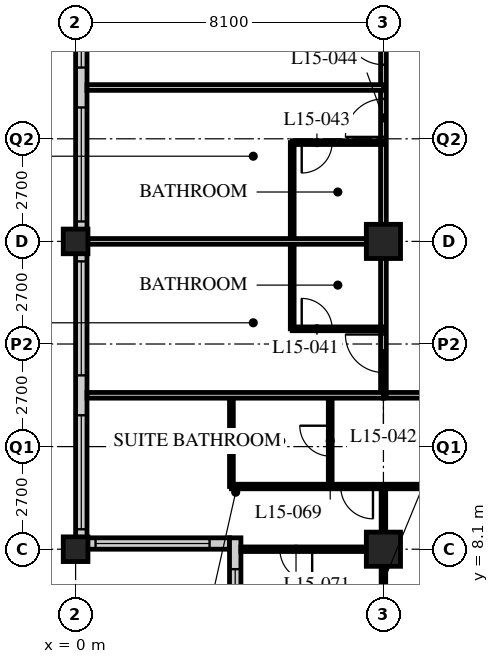
"""IFC4 building model, lengths in metres.
Left out: names, types, materials, properties, quantities, classifications, styles, units other than length and angle.
Written with IfcOpenShell. Run it as: python <this file> out.ifc"""

import sys

from ifc_helpers import new_model, si_unit, direction, frame, frame_2d, origin, origin_2d, place, context, subcontext, project, spatial, rectangle, hollow_rectangle, extrude, element, fill, save


model = new_model("IFC4")
c1 = context("Model", 3, precision=1e-05, world=origin(), true_north=direction((0.0, 1.0)))
c2 = subcontext(c1, "Body", "Model", "MODEL_VIEW")
j1 = project(units=[si_unit("LENGTHUNIT", "METRE"), si_unit("PLANEANGLEUNIT", "RADIAN")], contexts=[c1])
p1 = place(None, origin())
s1 = spatial("IfcSite", under=j1, at=p1, CompositionType="ELEMENT")
p2 = place(p1, origin())
s2 = spatial("IfcBuilding", under=s1, at=p2, CompositionType="ELEMENT")
p3 = place(p2, frame((0.0, 0.0, 63.6)))
s3 = spatial("IfcBuildingStorey", under=s2, at=p3, CompositionType="ELEMENT", Elevation=63.6)
for number, where, z_axis, x_axis in (
    (1, (0.0, 8.1, 0.0), (0.0, 0.0, 1.0), (1.0, 0.0, 0.0)),
    (2, (0.0, 16.2, 0.0), (0.0, 0.0, 1.0), (1.0, 0.0, 0.0)),
):
    element("IfcColumn", number, at=place(p3, frame(where, z_axis=z_axis, x_axis=x_axis)), inside=s3, PredefinedType="COLUMN", context=c2, shape_type="SweptSolid", body=[
        extrude(hollow_rectangle(XDim=0.65, YDim=0.65, WallThickness=0.05, at=origin_2d()), origin(), (0.0, 0.0, 1.0), 3.4),
    ])
for number, where, z_axis, x_axis in (
    (3, (8.1, 8.1, 0.0), (0.0, 0.0, 1.0), (1.0, 0.0, 0.0)),
    (4, (8.1, 16.2, 0.0), (0.0, 0.0, 1.0), (1.0, 0.0, 0.0)),
):
    element("IfcColumn", number, at=place(p3, frame(where, z_axis=z_axis, x_axis=x_axis)), inside=s3, PredefinedType="COLUMN", context=c2, shape_type="SweptSolid", body=[
        extrude(hollow_rectangle(XDim=0.9, YDim=0.9, WallThickness=0.09, at=origin_2d()), origin(), (0.0, 0.0, 1.0), 3.4),
    ])
p4 = place(p3, frame((0.15, 40.2, 0.0), z_axis=(0.0, 0.0, 1.0), x_axis=(0.0, -1.0, 0.0)))
e5 = element("IfcWall", 5, at=p4, inside=s3, PredefinedType="SOLIDWALL", context=c2, shape_type="SweptSolid", body=[
    extrude(rectangle(XDim=32.1, YDim=0.3, at=frame_2d((16.05, 0.0))), origin(), (0.0, 0.0, 1.0), 3.19),
])
p5 = place(p4, frame((0.225, 0.0, 0.9)))
e6 = element("IfcOpeningElement", 6, at=p5, cuts=e5, PredefinedType="OPENING", context=c2, shape_type="SweptSolid", body=[
    extrude(rectangle(XDim=3.0, YDim=2.0, at=frame_2d((1.5, 1.0))), frame((0.0, 0.16, 0.0), z_axis=(0.0, -1.0, 0.0), x_axis=(1.0, 0.0, 0.0)), (0.0, 0.0, 1.0), 0.32),
])
p6 = place(p4, frame((4.275, 0.0, 0.9)))
e7 = element("IfcOpeningElement", 7, at=p6, cuts=e5, PredefinedType="OPENING", context=c2, shape_type="SweptSolid", body=[
    extrude(rectangle(XDim=3.0, YDim=2.0, at=frame_2d((1.5, 1.0))), frame((0.0, 0.16, 0.0), z_axis=(0.0, -1.0, 0.0), x_axis=(1.0, 0.0, 0.0)), (0.0, 0.0, 1.0), 0.32),
])
p7 = place(p4, frame((8.325, 0.0, 0.9)))
e8 = element("IfcOpeningElement", 8, at=p7, cuts=e5, PredefinedType="OPENING", context=c2, shape_type="SweptSolid", body=[
    extrude(rectangle(XDim=3.0, YDim=2.0, at=frame_2d((1.5, 1.0))), frame((0.0, 0.16, 0.0), z_axis=(0.0, -1.0, 0.0), x_axis=(1.0, 0.0, 0.0)), (0.0, 0.0, 1.0), 0.32),
])
p8 = place(p4, frame((12.375, 0.0, 0.9)))
e9 = element("IfcOpeningElement", 9, at=p8, cuts=e5, PredefinedType="OPENING", context=c2, shape_type="SweptSolid", body=[
    extrude(rectangle(XDim=3.0, YDim=2.0, at=frame_2d((1.5, 1.0))), frame((0.0, 0.16, 0.0), z_axis=(0.0, -1.0, 0.0), x_axis=(1.0, 0.0, 0.0)), (0.0, 0.0, 1.0), 0.32),
])
p9 = place(p4, frame((16.425, 0.0, 0.9)))
e10 = element("IfcOpeningElement", 10, at=p9, cuts=e5, PredefinedType="OPENING", context=c2, shape_type="SweptSolid", body=[
    extrude(rectangle(XDim=3.0, YDim=2.0, at=frame_2d((1.5, 1.0))), frame((0.0, 0.16, 0.0), z_axis=(0.0, -1.0, 0.0), x_axis=(1.0, 0.0, 0.0)), (0.0, 0.0, 1.0), 0.32),
])
p10 = place(p4, frame((20.475, 0.0, 0.9)))
e11 = element("IfcOpeningElement", 11, at=p10, cuts=e5, PredefinedType="OPENING", context=c2, shape_type="SweptSolid", body=[
    extrude(rectangle(XDim=3.0, YDim=2.0, at=frame_2d((1.5, 1.0))), frame((0.0, 0.16, 0.0), z_axis=(0.0, -1.0, 0.0), x_axis=(1.0, 0.0, 0.0)), (0.0, 0.0, 1.0), 0.32),
])
p11 = place(p4, frame((24.525, 0.0, 0.9)))
e12 = element("IfcOpeningElement", 12, at=p11, cuts=e5, PredefinedType="OPENING", context=c2, shape_type="SweptSolid", body=[
    extrude(rectangle(XDim=3.0, YDim=2.0, at=frame_2d((1.5, 1.0))), frame((0.0, 0.16, 0.0), z_axis=(0.0, -1.0, 0.0), x_axis=(1.0, 0.0, 0.0)), (0.0, 0.0, 1.0), 0.32),
])
p12 = place(p4, frame((28.575, 0.0, 0.9)))
e13 = element("IfcOpeningElement", 13, at=p12, cuts=e5, PredefinedType="OPENING", context=c2, shape_type="SweptSolid", body=[
    extrude(rectangle(XDim=3.0, YDim=2.0, at=frame_2d((1.5, 1.0))), frame((0.0, 0.16, 0.0), z_axis=(0.0, -1.0, 0.0), x_axis=(1.0, 0.0, 0.0)), (0.0, 0.0, 1.0), 0.32),
])
p13 = place(p3, frame((0.3, 8.25, 0.0), z_axis=(0.0, 0.0, 1.0), x_axis=(1.0, 0.0, 0.0)))
e14 = element("IfcWall", 14, at=p13, inside=s3, PredefinedType="SOLIDWALL", context=c2, shape_type="SweptSolid", body=[
    extrude(rectangle(XDim=3.75, YDim=0.3, at=frame_2d((1.875, 0.0))), origin(), (0.0, 0.0, 1.0), 3.19),
])
p14 = place(p13, frame((0.225, 0.0, 0.9)))
e15 = element("IfcOpeningElement", 15, at=p14, cuts=e14, PredefinedType="OPENING", context=c2, shape_type="SweptSolid", body=[
    extrude(rectangle(XDim=3.0, YDim=1.5, at=frame_2d((1.5, 0.75))), frame((0.0, 0.16, 0.0), z_axis=(0.0, -1.0, 0.0), x_axis=(1.0, 0.0, 0.0)), (0.0, 0.0, 1.0), 0.32),
])
p15 = place(p3, frame((4.2, 8.4, 0.0), z_axis=(0.0, 0.0, 1.0), x_axis=(0.0, -1.0, 0.0)))
e16 = element("IfcWall", 16, at=p15, inside=s3, PredefinedType="SOLIDWALL", context=c2, shape_type="SweptSolid", body=[
    extrude(rectangle(XDim=4.35, YDim=0.3, at=frame_2d((2.175, 0.0))), origin(), (0.0, 0.0, 1.0), 3.19),
])
p16 = place(p15, frame((0.825, 0.0, 0.9)))
e17 = element("IfcOpeningElement", 17, at=p16, cuts=e16, PredefinedType="OPENING", context=c2, shape_type="SweptSolid", body=[
    extrude(rectangle(XDim=3.0, YDim=1.5, at=frame_2d((1.5, 0.75))), frame((0.0, 0.16, 0.0), z_axis=(0.0, -1.0, 0.0), x_axis=(1.0, 0.0, 0.0)), (0.0, 0.0, 1.0), 0.32),
])
p17 = place(p3, frame((8.1, 12.15, 0.0), z_axis=(0.0, 0.0, 1.0), x_axis=(1.0, 0.0, 0.0)))
e18 = element("IfcWall", 18, at=p17, inside=s3, PredefinedType="PARTITIONING", context=c2, shape_type="SweptSolid", body=[
    extrude(rectangle(XDim=36.45, YDim=0.15, at=frame_2d((18.225, 0.0))), origin(), (0.0, 0.0, 1.0), 3.19),
])
p18 = place(p17, frame((4.35, 0.0, 0.0)))
e19 = element("IfcOpeningElement", 19, at=p18, cuts=e18, PredefinedType="OPENING", context=c2, shape_type="SweptSolid", body=[
    extrude(rectangle(XDim=1.0, YDim=2.1, at=frame_2d((0.5, 1.05))), frame((0.0, 0.085, 0.0), z_axis=(0.0, -1.0, 0.0), x_axis=(1.0, 0.0, 0.0)), (0.0, 0.0, 1.0), 0.17),
])
p19 = place(p17, frame((10.55, 0.0, 0.0)))
e20 = element("IfcOpeningElement", 20, at=p19, cuts=e18, PredefinedType="OPENING", context=c2, shape_type="SweptSolid", body=[
    extrude(rectangle(XDim=1.0, YDim=2.1, at=frame_2d((0.5, 1.05))), frame((0.0, 0.085, 0.0), z_axis=(0.0, -1.0, 0.0), x_axis=(1.0, 0.0, 0.0)), (0.0, 0.0, 1.0), 0.17),
])
p20 = place(p17, frame((14.6, 0.0, 0.0)))
e21 = element("IfcOpeningElement", 21, at=p20, cuts=e18, PredefinedType="OPENING", context=c2, shape_type="SweptSolid", body=[
    extrude(rectangle(XDim=1.0, YDim=2.1, at=frame_2d((0.5, 1.05))), frame((0.0, 0.085, 0.0), z_axis=(0.0, -1.0, 0.0), x_axis=(1.0, 0.0, 0.0)), (0.0, 0.0, 1.0), 0.17),
])
p21 = place(p17, frame((18.65, 0.0, 0.0)))
e22 = element("IfcOpeningElement", 22, at=p21, cuts=e18, PredefinedType="OPENING", context=c2, shape_type="SweptSolid", body=[
    extrude(rectangle(XDim=1.0, YDim=2.1, at=frame_2d((0.5, 1.05))), frame((0.0, 0.085, 0.0), z_axis=(0.0, -1.0, 0.0), x_axis=(1.0, 0.0, 0.0)), (0.0, 0.0, 1.0), 0.17),
])
p22 = place(p17, frame((22.7, 0.0, 0.0)))
e23 = element("IfcOpeningElement", 23, at=p22, cuts=e18, PredefinedType="OPENING", context=c2, shape_type="SweptSolid", body=[
    extrude(rectangle(XDim=1.0, YDim=2.1, at=frame_2d((0.5, 1.05))), frame((0.0, 0.085, 0.0), z_axis=(0.0, -1.0, 0.0), x_axis=(1.0, 0.0, 0.0)), (0.0, 0.0, 1.0), 0.17),
])
p23 = place(p17, frame((24.6, 0.0, 0.0)))
e24 = element("IfcOpeningElement", 24, at=p23, cuts=e18, PredefinedType="OPENING", context=c2, shape_type="SweptSolid", body=[
    extrude(rectangle(XDim=1.0, YDim=2.1, at=frame_2d((0.5, 1.05))), frame((0.0, 0.085, 0.0), z_axis=(0.0, -1.0, 0.0), x_axis=(1.0, 0.0, 0.0)), (0.0, 0.0, 1.0), 0.17),
])
p24 = place(p17, frame((30.8, 0.0, 0.0)))
e25 = element("IfcOpeningElement", 25, at=p24, cuts=e18, PredefinedType="OPENING", context=c2, shape_type="SweptSolid", body=[
    extrude(rectangle(XDim=1.0, YDim=2.1, at=frame_2d((0.5, 1.05))), frame((0.0, 0.085, 0.0), z_axis=(0.0, -1.0, 0.0), x_axis=(1.0, 0.0, 0.0)), (0.0, 0.0, 1.0), 0.17),
])
p25 = place(p17, frame((1.525, 0.0, 0.0)))
e26 = element("IfcOpeningElement", 26, at=p25, cuts=e18, PredefinedType="OPENING", context=c2, shape_type="SweptSolid", body=[
    extrude(rectangle(XDim=1.0, YDim=2.1, at=frame_2d((0.5, 1.05))), frame((0.0, 0.085, 0.0), z_axis=(0.0, -1.0, 0.0), x_axis=(1.0, 0.0, 0.0)), (0.0, 0.0, 1.0), 0.17),
])
p26 = place(p17, frame((33.925, 0.0, 0.0)))
e27 = element("IfcOpeningElement", 27, at=p26, cuts=e18, PredefinedType="OPENING", context=c2, shape_type="SweptSolid", body=[
    extrude(rectangle(XDim=1.0, YDim=2.1, at=frame_2d((0.5, 1.05))), frame((0.0, 0.085, 0.0), z_axis=(0.0, -1.0, 0.0), x_axis=(1.0, 0.0, 0.0)), (0.0, 0.0, 1.0), 0.17),
])
p27 = place(p3, frame((8.1, 12.15, 0.0), z_axis=(0.0, 0.0, 1.0), x_axis=(0.0, 1.0, 0.0)))
e28 = element("IfcWall", 28, at=p27, inside=s3, PredefinedType="PARTITIONING", context=c2, shape_type="SweptSolid", body=[
    extrude(rectangle(XDim=30.15, YDim=0.15, at=frame_2d((15.075, 0.0))), origin(), (0.0, 0.0, 1.0), 2.578),
])
p28 = place(p27, frame((0.6, 0.0, 0.0)))
e29 = element("IfcOpeningElement", 29, at=p28, cuts=e28, PredefinedType="OPENING", context=c2, shape_type="SweptSolid", body=[
    extrude(rectangle(XDim=1.0, YDim=2.1, at=frame_2d((0.5, 1.05))), frame((0.0, 0.085, 0.0), z_axis=(0.0, -1.0, 0.0), x_axis=(1.0, 0.0, 0.0)), (0.0, 0.0, 1.0), 0.17),
])
p29 = place(p27, frame((6.8, 0.0, 0.0)))
e30 = element("IfcOpeningElement", 30, at=p29, cuts=e28, PredefinedType="OPENING", context=c2, shape_type="SweptSolid", body=[
    extrude(rectangle(XDim=1.0, YDim=2.1, at=frame_2d((0.5, 1.05))), frame((0.0, 0.085, 0.0), z_axis=(0.0, -1.0, 0.0), x_axis=(1.0, 0.0, 0.0)), (0.0, 0.0, 1.0), 0.17),
])
p30 = place(p27, frame((8.7, 0.0, 0.0)))
e31 = element("IfcOpeningElement", 31, at=p30, cuts=e28, PredefinedType="OPENING", context=c2, shape_type="SweptSolid", body=[
    extrude(rectangle(XDim=1.0, YDim=2.1, at=frame_2d((0.5, 1.05))), frame((0.0, 0.085, 0.0), z_axis=(0.0, -1.0, 0.0), x_axis=(1.0, 0.0, 0.0)), (0.0, 0.0, 1.0), 0.17),
])
p31 = place(p27, frame((14.6, 0.0, 0.0)))
e32 = element("IfcOpeningElement", 32, at=p31, cuts=e28, PredefinedType="OPENING", context=c2, shape_type="SweptSolid", body=[
    extrude(rectangle(XDim=1.0, YDim=2.1, at=frame_2d((0.5, 1.05))), frame((0.0, 0.085, 0.0), z_axis=(0.0, -1.0, 0.0), x_axis=(1.0, 0.0, 0.0)), (0.0, 0.0, 1.0), 0.17),
])
p32 = place(p27, frame((21.65, 0.0, 0.0)))
e33 = element("IfcOpeningElement", 33, at=p32, cuts=e28, PredefinedType="OPENING", context=c2, shape_type="SweptSolid", body=[
    extrude(rectangle(XDim=1.0, YDim=2.1, at=frame_2d((0.5, 1.05))), frame((0.0, 0.085, 0.0), z_axis=(0.0, -1.0, 0.0), x_axis=(1.0, 0.0, 0.0)), (0.0, 0.0, 1.0), 0.17),
])
p33 = place(p27, frame((26.75, 0.0, 0.0)))
e34 = element("IfcOpeningElement", 34, at=p33, cuts=e28, PredefinedType="OPENING", context=c2, shape_type="SweptSolid", body=[
    extrude(rectangle(XDim=1.0, YDim=2.1, at=frame_2d((0.5, 1.05))), frame((0.0, 0.085, 0.0), z_axis=(0.0, -1.0, 0.0), x_axis=(1.0, 0.0, 0.0)), (0.0, 0.0, 1.0), 0.17),
])
p34 = place(p3, frame((5.7, 13.9, 0.0), z_axis=(0.0, 0.0, 1.0), x_axis=(0.0, 1.0, 0.0)))
e35 = element("IfcWall", 35, at=p34, inside=s3, PredefinedType="PARTITIONING", context=c2, shape_type="SweptSolid", body=[
    extrude(rectangle(XDim=4.9, YDim=0.1, at=frame_2d((2.45, 0.0))), origin(), (0.0, 0.0, 1.0), 3.19),
])
p35 = place(p3, frame((8.1, 13.9, 0.0), z_axis=(0.0, 0.0, 1.0), x_axis=(-1.0, 0.0, 0.0)))
e36 = element("IfcWall", 36, at=p35, inside=s3, PredefinedType="PARTITIONING", context=c2, shape_type="SweptSolid", body=[
    extrude(rectangle(XDim=2.4, YDim=0.1, at=frame_2d((1.2, 0.0))), origin(), (0.0, 0.0, 1.0), 3.19),
])
p36 = place(p35, frame((1.35, 0.0, 0.0)))
e37 = element("IfcOpeningElement", 37, at=p36, cuts=e36, PredefinedType="OPENING", context=c2, shape_type="SweptSolid", body=[
    extrude(rectangle(XDim=0.8, YDim=2.1, at=frame_2d((0.4, 1.05))), frame((0.0, 0.06, 0.0), z_axis=(0.0, -1.0, 0.0), x_axis=(1.0, 0.0, 0.0)), (0.0, 0.0, 1.0), 0.12),
])
p37 = place(p3, frame((8.1, 16.2, 0.0), z_axis=(0.0, 0.0, 1.0), x_axis=(-1.0, 0.0, 0.0)))
e38 = element("IfcWall", 38, at=p37, inside=s3, PredefinedType="PARTITIONING", context=c2, shape_type="SweptSolid", body=[
    extrude(rectangle(XDim=7.8, YDim=0.15, at=frame_2d((3.9, 0.0))), origin(), (0.0, 0.0, 1.0), 2.578),
])
p38 = place(p3, frame((8.1, 18.8, 0.0), z_axis=(0.0, 0.0, 1.0), x_axis=(-1.0, 0.0, 0.0)))
e39 = element("IfcWall", 39, at=p38, inside=s3, PredefinedType="PARTITIONING", context=c2, shape_type="SweptSolid", body=[
    extrude(rectangle(XDim=2.4, YDim=0.1, at=frame_2d((1.2, 0.0))), origin(), (0.0, 0.0, 1.0), 3.19),
])
p39 = place(p38, frame((1.35, 0.0, 0.0)))
e40 = element("IfcOpeningElement", 40, at=p39, cuts=e39, PredefinedType="OPENING", context=c2, shape_type="SweptSolid", body=[
    extrude(rectangle(XDim=0.8, YDim=2.1, at=frame_2d((0.4, 1.05))), frame((0.0, 0.06, 0.0), z_axis=(0.0, -1.0, 0.0), x_axis=(1.0, 0.0, 0.0)), (0.0, 0.0, 1.0), 0.12),
])
p40 = place(p3, frame((8.1, 20.25, 0.0), z_axis=(0.0, 0.0, 1.0), x_axis=(-1.0, 0.0, 0.0)))
e41 = element("IfcWall", 41, at=p40, inside=s3, PredefinedType="PARTITIONING", context=c2, shape_type="SweptSolid", body=[
    extrude(rectangle(XDim=7.8, YDim=0.15, at=frame_2d((3.9, 0.0))), origin(), (0.0, 0.0, 1.0), 3.19),
])
p41 = place(p3, frame((6.7, 12.15, 0.0), z_axis=(0.0, 0.0, 1.0), x_axis=(0.0, -1.0, 0.0)))
e42 = element("IfcWall", 42, at=p41, inside=s3, PredefinedType="PARTITIONING", context=c2, shape_type="SweptSolid", body=[
    extrude(rectangle(XDim=2.4, YDim=0.1, at=frame_2d((1.2, 0.0))), origin(), (0.0, 0.0, 1.0), 3.19),
])
p42 = place(p41, frame((0.8, 0.0, 0.0)))
e43 = element("IfcOpeningElement", 43, at=p42, cuts=e42, PredefinedType="OPENING", context=c2, shape_type="SweptSolid", body=[
    extrude(rectangle(XDim=0.8, YDim=2.1, at=frame_2d((0.4, 1.05))), frame((0.0, 0.06, 0.0), z_axis=(0.0, -1.0, 0.0), x_axis=(1.0, 0.0, 0.0)), (0.0, 0.0, 1.0), 0.12),
])
p43 = place(p3, frame((4.1, 12.15, 0.0), z_axis=(0.0, 0.0, 1.0), x_axis=(0.0, -1.0, 0.0)))
e44 = element("IfcWall", 44, at=p43, inside=s3, PredefinedType="PARTITIONING", context=c2, shape_type="SweptSolid", body=[
    extrude(rectangle(XDim=2.4, YDim=0.1, at=frame_2d((1.2, 0.0))), origin(), (0.0, 0.0, 1.0), 3.19),
])
p44 = place(p3, frame((4.1, 9.75, 0.0), z_axis=(0.0, 0.0, 1.0), x_axis=(1.0, 0.0, 0.0)))
e45 = element("IfcWall", 45, at=p44, inside=s3, PredefinedType="PARTITIONING", context=c2, shape_type="SweptSolid", body=[
    extrude(rectangle(XDim=8.05, YDim=0.12, at=frame_2d((4.025, 0.0))), origin(), (0.0, 0.0, 1.0), 3.19),
])
p45 = place(p44, frame((6.725, 0.0, 0.0)))
e46 = element("IfcOpeningElement", 46, at=p45, cuts=e45, PredefinedType="OPENING", context=c2, shape_type="SweptSolid", body=[
    extrude(rectangle(XDim=0.85, YDim=2.1, at=frame_2d((0.425, 1.05))), frame((0.0, 0.07, 0.0), z_axis=(0.0, -1.0, 0.0), x_axis=(1.0, 0.0, 0.0)), (0.0, 0.0, 1.0), 0.14),
])
p46 = place(p44, frame((2.875, 0.0, 0.0)))
e47 = element("IfcOpeningElement", 47, at=p46, cuts=e45, PredefinedType="OPENING", context=c2, shape_type="SweptSolid", body=[
    extrude(rectangle(XDim=0.85, YDim=2.1, at=frame_2d((0.425, 1.05))), frame((0.0, 0.07, 0.0), z_axis=(0.0, -1.0, 0.0), x_axis=(1.0, 0.0, 0.0)), (0.0, 0.0, 1.0), 0.14),
])
p47 = place(p3, frame((8.1, 9.75, 0.0), z_axis=(0.0, 0.0, 1.0), x_axis=(0.0, -1.0, 0.0)))
e48 = element("IfcWall", 48, at=p47, inside=s3, PredefinedType="PARTITIONING", context=c2, shape_type="SweptSolid", body=[
    extrude(rectangle(XDim=5.4, YDim=0.12, at=frame_2d((2.7, 0.0))), origin(), (0.0, 0.0, 1.0), 2.578),
])
p48 = place(p3, frame((8.1, 8.1, 0.0), z_axis=(0.0, 0.0, 1.0), x_axis=(-1.0, 0.0, 0.0)))
e49 = element("IfcWall", 49, at=p48, inside=s3, PredefinedType="PARTITIONING", context=c2, shape_type="SweptSolid", body=[
    extrude(rectangle(XDim=3.75, YDim=0.12, at=frame_2d((1.875, 0.0))), origin(), (0.0, 0.0, 1.0), 2.578),
])
p49 = place(p48, frame((1.875, 0.0, 0.0)))
e50 = element("IfcOpeningElement", 50, at=p49, cuts=e49, PredefinedType="OPENING", context=c2, shape_type="SweptSolid", body=[
    extrude(rectangle(XDim=0.85, YDim=2.1, at=frame_2d((0.425, 1.05))), frame((0.0, 0.07, 0.0), z_axis=(0.0, -1.0, 0.0), x_axis=(1.0, 0.0, 0.0)), (0.0, 0.0, 1.0), 0.14),
])
p50 = place(p3, frame((0.3, 12.15, 0.0), z_axis=(0.0, 0.0, 1.0), x_axis=(1.0, 0.0, 0.0)))
e51 = element("IfcWall", 51, at=p50, inside=s3, PredefinedType="PARTITIONING", context=c2, shape_type="SweptSolid", body=[
    extrude(rectangle(XDim=7.8, YDim=0.15, at=frame_2d((3.9, 0.0))), origin(), (0.0, 0.0, 1.0), 3.19),
])
p51 = place(p9, origin())
e52 = element("IfcWindow", 52, at=p51, inside=s3, PartitioningType="SINGLE_PANEL", PredefinedType="WINDOW", context=c2, shape_type="SweptSolid", body=[
    extrude(rectangle(XDim=3.0, YDim=2.0, at=frame_2d((1.5, 1.0))), frame((0.0, 0.03, 0.0), z_axis=(0.0, -1.0, 0.0), x_axis=(1.0, 0.0, 0.0)), (0.0, 0.0, 1.0), 0.06),
])
fill(e10, e52)
p52 = place(p10, origin())
e53 = element("IfcWindow", 53, at=p52, inside=s3, PartitioningType="SINGLE_PANEL", PredefinedType="WINDOW", context=c2, shape_type="SweptSolid", body=[
    extrude(rectangle(XDim=3.0, YDim=2.0, at=frame_2d((1.5, 1.0))), frame((0.0, 0.03, 0.0), z_axis=(0.0, -1.0, 0.0), x_axis=(1.0, 0.0, 0.0)), (0.0, 0.0, 1.0), 0.06),
])
fill(e11, e53)
p53 = place(p11, origin())
e54 = element("IfcWindow", 54, at=p53, inside=s3, PartitioningType="SINGLE_PANEL", PredefinedType="WINDOW", context=c2, shape_type="SweptSolid", body=[
    extrude(rectangle(XDim=3.0, YDim=2.0, at=frame_2d((1.5, 1.0))), frame((0.0, 0.03, 0.0), z_axis=(0.0, -1.0, 0.0), x_axis=(1.0, 0.0, 0.0)), (0.0, 0.0, 1.0), 0.06),
])
fill(e12, e54)
p54 = place(p12, origin())
e55 = element("IfcWindow", 55, at=p54, inside=s3, PartitioningType="SINGLE_PANEL", PredefinedType="WINDOW", context=c2, shape_type="SweptSolid", body=[
    extrude(rectangle(XDim=3.0, YDim=2.0, at=frame_2d((1.5, 1.0))), frame((0.0, 0.03, 0.0), z_axis=(0.0, -1.0, 0.0), x_axis=(1.0, 0.0, 0.0)), (0.0, 0.0, 1.0), 0.06),
])
fill(e13, e55)
p55 = place(p14, origin())
e56 = element("IfcWindow", 56, at=p55, inside=s3, PartitioningType="SINGLE_PANEL", PredefinedType="WINDOW", context=c2, shape_type="SweptSolid", body=[
    extrude(rectangle(XDim=3.0, YDim=1.5, at=frame_2d((1.5, 0.75))), frame((0.0, 0.03, 0.0), z_axis=(0.0, -1.0, 0.0), x_axis=(1.0, 0.0, 0.0)), (0.0, 0.0, 1.0), 0.06),
])
fill(e15, e56)
p56 = place(p16, origin())
e57 = element("IfcWindow", 57, at=p56, inside=s3, PartitioningType="SINGLE_PANEL", PredefinedType="WINDOW", context=c2, shape_type="SweptSolid", body=[
    extrude(rectangle(XDim=3.0, YDim=1.5, at=frame_2d((1.5, 0.75))), frame((0.0, 0.03, 0.0), z_axis=(0.0, -1.0, 0.0), x_axis=(1.0, 0.0, 0.0)), (0.0, 0.0, 1.0), 0.06),
])
fill(e17, e57)
p57 = place(p36, origin())
e58 = element("IfcDoor", 58, at=p57, inside=s3, OperationType="SINGLE_SWING_LEFT", PredefinedType="DOOR", context=c2, shape_type="SweptSolid", body=[
    extrude(rectangle(XDim=0.8, YDim=2.1, at=frame_2d((0.4, 1.05))), frame((0.0, 0.025, 0.0), z_axis=(0.0, -1.0, 0.0), x_axis=(1.0, 0.0, 0.0)), (0.0, 0.0, 1.0), 0.05),
])
fill(e37, e58)
p58 = place(p28, origin())
e59 = element("IfcDoor", 59, at=p58, inside=s3, OperationType="SINGLE_SWING_RIGHT", PredefinedType="DOOR", context=c2, shape_type="SweptSolid", body=[
    extrude(rectangle(XDim=1.0, YDim=2.1, at=frame_2d((0.5, 1.05))), frame((0.0, 0.025, 0.0), z_axis=(0.0, -1.0, 0.0), x_axis=(1.0, 0.0, 0.0)), (0.0, 0.0, 1.0), 0.05),
])
fill(e29, e59)
p59 = place(p39, origin())
e60 = element("IfcDoor", 60, at=p59, inside=s3, OperationType="SINGLE_SWING_RIGHT", PredefinedType="DOOR", context=c2, shape_type="SweptSolid", body=[
    extrude(rectangle(XDim=0.8, YDim=2.1, at=frame_2d((0.4, 1.05))), frame((0.0, 0.025, 0.0), z_axis=(0.0, -1.0, 0.0), x_axis=(1.0, 0.0, 0.0)), (0.0, 0.0, 1.0), 0.05),
])
fill(e40, e60)
p60 = place(p29, origin())
e61 = element("IfcDoor", 61, at=p60, inside=s3, OperationType="SINGLE_SWING_LEFT", PredefinedType="DOOR", context=c2, shape_type="SweptSolid", body=[
    extrude(rectangle(XDim=1.0, YDim=2.1, at=frame_2d((0.5, 1.05))), frame((0.0, 0.025, 0.0), z_axis=(0.0, -1.0, 0.0), x_axis=(1.0, 0.0, 0.0)), (0.0, 0.0, 1.0), 0.05),
])
fill(e30, e61)
p61 = place(p30, origin())
e62 = element("IfcDoor", 62, at=p61, inside=s3, OperationType="SINGLE_SWING_RIGHT", PredefinedType="DOOR", context=c2, shape_type="SweptSolid", body=[
    extrude(rectangle(XDim=1.0, YDim=2.1, at=frame_2d((0.5, 1.05))), frame((0.0, 0.025, 0.0), z_axis=(0.0, -1.0, 0.0), x_axis=(1.0, 0.0, 0.0)), (0.0, 0.0, 1.0), 0.05),
])
fill(e31, e62)
p62 = place(p42, origin())
e63 = element("IfcDoor", 63, at=p62, inside=s3, OperationType="SINGLE_SWING_RIGHT", PredefinedType="DOOR", context=c2, shape_type="SweptSolid", body=[
    extrude(rectangle(XDim=0.8, YDim=2.1, at=frame_2d((0.4, 1.05))), frame((0.0, 0.025, 0.0), z_axis=(0.0, -1.0, 0.0), x_axis=(1.0, 0.0, 0.0)), (0.0, 0.0, 1.0), 0.05),
])
fill(e43, e63)
p63 = place(p46, origin())
e64 = element("IfcDoor", 64, at=p63, inside=s3, OperationType="SINGLE_SWING_LEFT", PredefinedType="DOOR", context=c2, shape_type="SweptSolid", body=[
    extrude(rectangle(XDim=0.85, YDim=2.1, at=frame_2d((0.425, 1.05))), frame((0.0, 0.025, 0.0), z_axis=(0.0, -1.0, 0.0), x_axis=(1.0, 0.0, 0.0)), (0.0, 0.0, 1.0), 0.05),
])
fill(e47, e64)
p64 = place(p49, origin())
e65 = element("IfcDoor", 65, at=p64, inside=s3, OperationType="SINGLE_SWING_LEFT", PredefinedType="DOOR", context=c2, shape_type="SweptSolid", body=[
    extrude(rectangle(XDim=0.85, YDim=2.1, at=frame_2d((0.425, 1.05))), frame((0.0, 0.025, 0.0), z_axis=(0.0, -1.0, 0.0), x_axis=(1.0, 0.0, 0.0)), (0.0, 0.0, 1.0), 0.05),
])
fill(e50, e65)
save(model, sys.argv[1])
